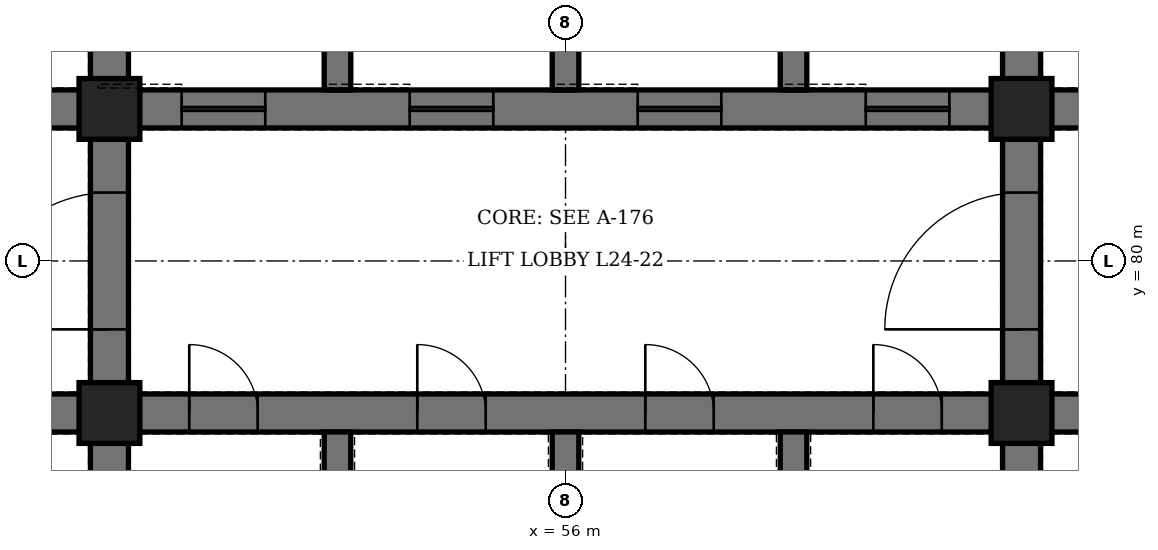
"""IFC4 building model, lengths in metres.
Left out: names, types, materials, properties, quantities, classifications, styles, units other than length and angle.
Written with IfcOpenShell. Run it as: python <this file> out.ifc"""

import sys

from ifc_helpers import new_model, si_unit, direction, frame, frame_2d, origin, origin_2d, place, context, subcontext, project, spatial, rectangle, hollow_rectangle, extrude, element, fill, save


model = new_model("IFC4")
c1 = context("Model", 3, precision=1e-05, world=origin(), true_north=direction((0.0, 1.0)))
c2 = subcontext(c1, "Body", "Model", "MODEL_VIEW")
j1 = project(units=[si_unit("LENGTHUNIT", "METRE"), si_unit("PLANEANGLEUNIT", "RADIAN")], contexts=[c1])
p1 = place(None, origin())
s1 = spatial("IfcSite", under=j1, at=p1, CompositionType="ELEMENT")
p2 = place(p1, origin())
s2 = spatial("IfcBuilding", under=s1, at=p2, CompositionType="ELEMENT")
p3 = place(p2, frame((0.0, 0.0, 112.3)))
s3 = spatial("IfcBuildingStorey", under=s2, at=p3, CompositionType="ELEMENT", Elevation=112.3)
p4 = place(p3, frame((50.0, 71.6, 0.0), z_axis=(0.0, 0.0, 1.0), x_axis=(0.0, 1.0, 0.0)))
e1 = element("IfcWall", 1, at=p4, inside=s3, PredefinedType="SHEAR", context=c2, shape_type="SweptSolid", body=[
    extrude(rectangle(XDim=16.8, YDim=0.5, at=frame_2d((8.4, 0.0))), origin(), (0.0, 0.0, 1.0), 4.2),
])
p5 = place(p4, frame((7.5, 0.0, 0.0)))
e2 = element("IfcOpeningElement", 2, at=p5, cuts=e1, PredefinedType="OPENING", context=c2, shape_type="SweptSolid", body=[
    extrude(rectangle(XDim=1.8, YDim=2.4, at=frame_2d((0.9, 1.2))), frame((0.0, 0.26, 0.0), z_axis=(0.0, -1.0, 0.0), x_axis=(1.0, 0.0, 0.0)), (0.0, 0.0, 1.0), 0.52),
])
p6 = place(p3, frame((62.0, 71.6, 0.0), z_axis=(0.0, 0.0, 1.0), x_axis=(0.0, 1.0, 0.0)))
e3 = element("IfcWall", 3, at=p6, inside=s3, PredefinedType="SHEAR", context=c2, shape_type="SweptSolid", body=[
    extrude(rectangle(XDim=16.8, YDim=0.5, at=frame_2d((8.4, 0.0))), origin(), (0.0, 0.0, 1.0), 4.2),
])
p7 = place(p6, frame((7.5, 0.0, 0.0)))
e4 = element("IfcOpeningElement", 4, at=p7, cuts=e3, PredefinedType="OPENING", context=c2, shape_type="SweptSolid", body=[
    extrude(rectangle(XDim=1.8, YDim=2.4, at=frame_2d((0.9, 1.2))), frame((0.0, 0.26, 0.0), z_axis=(0.0, -1.0, 0.0), x_axis=(1.0, 0.0, 0.0)), (0.0, 0.0, 1.0), 0.52),
])
p8 = place(p3, frame((44.6, 78.0, 0.0), z_axis=(0.0, 0.0, 1.0), x_axis=(1.0, 0.0, 0.0)))
e5 = element("IfcWall", 5, at=p8, inside=s3, PredefinedType="SHEAR", context=c2, shape_type="SweptSolid", body=[
    extrude(rectangle(XDim=5.15, YDim=0.5, at=frame_2d((2.575, 0.0))), origin(), (0.0, 0.0, 1.0), 4.2),
])
p9 = place(p8, frame((1.8, 0.0, 0.0)))
e6 = element("IfcOpeningElement", 6, at=p9, cuts=e5, PredefinedType="OPENING", context=c2, shape_type="SweptSolid", body=[
    extrude(rectangle(XDim=1.2, YDim=2.1, at=frame_2d((0.6, 1.05))), frame((0.0, 0.26, 0.0), z_axis=(0.0, -1.0, 0.0), x_axis=(1.0, 0.0, 0.0)), (0.0, 0.0, 1.0), 0.52),
])
p10 = place(p3, frame((44.6, 82.0, 0.0), z_axis=(0.0, 0.0, 1.0), x_axis=(1.0, 0.0, 0.0)))
e7 = element("IfcWall", 7, at=p10, inside=s3, PredefinedType="SHEAR", context=c2, shape_type="SweptSolid", body=[
    extrude(rectangle(XDim=5.15, YDim=0.5, at=frame_2d((2.575, 0.0))), origin(), (0.0, 0.0, 1.0), 4.2),
])
p11 = place(p10, frame((0.7, 0.0, 0.0)))
e8 = element("IfcOpeningElement", 8, at=p11, cuts=e7, PredefinedType="OPENING", context=c2, shape_type="SweptSolid", body=[
    extrude(rectangle(XDim=0.9, YDim=2.1, at=frame_2d((0.45, 1.05))), frame((0.0, 0.26, 0.0), z_axis=(0.0, -1.0, 0.0), x_axis=(1.0, 0.0, 0.0)), (0.0, 0.0, 1.0), 0.52),
])
p12 = place(p3, frame((62.25, 78.0, 0.0), z_axis=(0.0, 0.0, 1.0), x_axis=(1.0, 0.0, 0.0)))
e9 = element("IfcWall", 9, at=p12, inside=s3, PredefinedType="SHEAR", context=c2, shape_type="SweptSolid", body=[
    extrude(rectangle(XDim=5.15, YDim=0.5, at=frame_2d((2.575, 0.0))), origin(), (0.0, 0.0, 1.0), 4.2),
])
p13 = place(p12, frame((2.15, 0.0, 0.0)))
e10 = element("IfcOpeningElement", 10, at=p13, cuts=e9, PredefinedType="OPENING", context=c2, shape_type="SweptSolid", body=[
    extrude(rectangle(XDim=1.2, YDim=2.1, at=frame_2d((0.6, 1.05))), frame((0.0, 0.26, 0.0), z_axis=(0.0, -1.0, 0.0), x_axis=(1.0, 0.0, 0.0)), (0.0, 0.0, 1.0), 0.52),
])
p14 = place(p3, frame((62.25, 82.0, 0.0), z_axis=(0.0, 0.0, 1.0), x_axis=(1.0, 0.0, 0.0)))
e11 = element("IfcWall", 11, at=p14, inside=s3, PredefinedType="SHEAR", context=c2, shape_type="SweptSolid", body=[
    extrude(rectangle(XDim=5.15, YDim=0.5, at=frame_2d((2.575, 0.0))), origin(), (0.0, 0.0, 1.0), 4.2),
])
p15 = place(p14, frame((2.15, 0.0, 0.0)))
e12 = element("IfcOpeningElement", 12, at=p15, cuts=e11, PredefinedType="OPENING", context=c2, shape_type="SweptSolid", body=[
    extrude(rectangle(XDim=1.2, YDim=2.1, at=frame_2d((0.6, 1.05))), frame((0.0, 0.26, 0.0), z_axis=(0.0, -1.0, 0.0), x_axis=(1.0, 0.0, 0.0)), (0.0, 0.0, 1.0), 0.52),
])
p16 = place(p3, frame((50.25, 78.0, 0.0), z_axis=(0.0, 0.0, 1.0), x_axis=(1.0, 0.0, 0.0)))
e13 = element("IfcWall", 13, at=p16, inside=s3, PredefinedType="SHEAR", context=c2, shape_type="SweptSolid", body=[
    extrude(rectangle(XDim=11.5, YDim=0.5, at=frame_2d((5.75, 0.0))), origin(), (0.0, 0.0, 1.0), 4.2),
])
p17 = place(p16, frame((0.8, 0.0, 0.0)))
e14 = element("IfcOpeningElement", 14, at=p17, cuts=e13, PredefinedType="OPENING", context=c2, shape_type="SweptSolid", body=[
    extrude(rectangle(XDim=0.9, YDim=2.1, at=frame_2d((0.45, 1.05))), frame((0.0, 0.26, 0.0), z_axis=(0.0, -1.0, 0.0), x_axis=(1.0, 0.0, 0.0)), (0.0, 0.0, 1.0), 0.52),
])
p18 = place(p16, frame((3.8, 0.0, 0.0)))
e15 = element("IfcOpeningElement", 15, at=p18, cuts=e13, PredefinedType="OPENING", context=c2, shape_type="SweptSolid", body=[
    extrude(rectangle(XDim=0.9, YDim=2.1, at=frame_2d((0.45, 1.05))), frame((0.0, 0.26, 0.0), z_axis=(0.0, -1.0, 0.0), x_axis=(1.0, 0.0, 0.0)), (0.0, 0.0, 1.0), 0.52),
])
p19 = place(p16, frame((6.8, 0.0, 0.0)))
e16 = element("IfcOpeningElement", 16, at=p19, cuts=e13, PredefinedType="OPENING", context=c2, shape_type="SweptSolid", body=[
    extrude(rectangle(XDim=0.9, YDim=2.1, at=frame_2d((0.45, 1.05))), frame((0.0, 0.26, 0.0), z_axis=(0.0, -1.0, 0.0), x_axis=(1.0, 0.0, 0.0)), (0.0, 0.0, 1.0), 0.52),
])
p20 = place(p16, frame((9.8, 0.0, 0.0)))
e17 = element("IfcOpeningElement", 17, at=p20, cuts=e13, PredefinedType="OPENING", context=c2, shape_type="SweptSolid", body=[
    extrude(rectangle(XDim=0.9, YDim=2.1, at=frame_2d((0.45, 1.05))), frame((0.0, 0.26, 0.0), z_axis=(0.0, -1.0, 0.0), x_axis=(1.0, 0.0, 0.0)), (0.0, 0.0, 1.0), 0.52),
])
p21 = place(p3, frame((50.25, 82.0, 0.0), z_axis=(0.0, 0.0, 1.0), x_axis=(1.0, 0.0, 0.0)))
e18 = element("IfcWall", 18, at=p21, inside=s3, PredefinedType="SHEAR", context=c2, shape_type="SweptSolid", body=[
    extrude(rectangle(XDim=11.5, YDim=0.5, at=frame_2d((5.75, 0.0))), origin(), (0.0, 0.0, 1.0), 4.2),
])
p22 = place(p21, frame((0.7, 0.0, 0.0)))
e19 = element("IfcOpeningElement", 19, at=p22, cuts=e18, PredefinedType="OPENING", context=c2, shape_type="SweptSolid", body=[
    extrude(rectangle(XDim=1.1, YDim=2.2, at=frame_2d((0.55, 1.1))), frame((0.0, 0.26, 0.0), z_axis=(0.0, -1.0, 0.0), x_axis=(1.0, 0.0, 0.0)), (0.0, 0.0, 1.0), 0.52),
])
p23 = place(p21, frame((3.7, 0.0, 0.0)))
e20 = element("IfcOpeningElement", 20, at=p23, cuts=e18, PredefinedType="OPENING", context=c2, shape_type="SweptSolid", body=[
    extrude(rectangle(XDim=1.1, YDim=2.2, at=frame_2d((0.55, 1.1))), frame((0.0, 0.26, 0.0), z_axis=(0.0, -1.0, 0.0), x_axis=(1.0, 0.0, 0.0)), (0.0, 0.0, 1.0), 0.52),
])
p24 = place(p21, frame((6.7, 0.0, 0.0)))
e21 = element("IfcOpeningElement", 21, at=p24, cuts=e18, PredefinedType="OPENING", context=c2, shape_type="SweptSolid", body=[
    extrude(rectangle(XDim=1.1, YDim=2.2, at=frame_2d((0.55, 1.1))), frame((0.0, 0.26, 0.0), z_axis=(0.0, -1.0, 0.0), x_axis=(1.0, 0.0, 0.0)), (0.0, 0.0, 1.0), 0.52),
])
p25 = place(p21, frame((9.7, 0.0, 0.0)))
e22 = element("IfcOpeningElement", 22, at=p25, cuts=e18, PredefinedType="OPENING", context=c2, shape_type="SweptSolid", body=[
    extrude(rectangle(XDim=1.1, YDim=2.2, at=frame_2d((0.55, 1.1))), frame((0.0, 0.26, 0.0), z_axis=(0.0, -1.0, 0.0), x_axis=(1.0, 0.0, 0.0)), (0.0, 0.0, 1.0), 0.52),
])
p26 = place(p3, frame((53.0, 74.175, 0.0), z_axis=(0.0, 0.0, 1.0), x_axis=(0.0, 1.0, 0.0)))
e23 = element("IfcWall", 23, at=p26, inside=s3, PredefinedType="SHEAR", context=c2, shape_type="SweptSolid", body=[
    extrude(rectangle(XDim=3.575, YDim=0.35, at=frame_2d((1.788, 0.0))), origin(), (0.0, 0.0, 1.0), 4.2),
])
p27 = place(p3, frame((53.0, 82.25, 0.0), z_axis=(0.0, 0.0, 1.0), x_axis=(0.0, 1.0, 0.0)))
e24 = element("IfcWall", 24, at=p27, inside=s3, PredefinedType="SHEAR", context=c2, shape_type="SweptSolid", body=[
    extrude(rectangle(XDim=3.5, YDim=0.35, at=frame_2d((1.75, 0.0))), origin(), (0.0, 0.0, 1.0), 4.2),
])
p28 = place(p3, frame((56.0, 74.175, 0.0), z_axis=(0.0, 0.0, 1.0), x_axis=(0.0, 1.0, 0.0)))
e25 = element("IfcWall", 25, at=p28, inside=s3, PredefinedType="SHEAR", context=c2, shape_type="SweptSolid", body=[
    extrude(rectangle(XDim=3.575, YDim=0.35, at=frame_2d((1.788, 0.0))), origin(), (0.0, 0.0, 1.0), 4.2),
])
p29 = place(p3, frame((56.0, 82.25, 0.0), z_axis=(0.0, 0.0, 1.0), x_axis=(0.0, 1.0, 0.0)))
e26 = element("IfcWall", 26, at=p29, inside=s3, PredefinedType="SHEAR", context=c2, shape_type="SweptSolid", body=[
    extrude(rectangle(XDim=3.5, YDim=0.35, at=frame_2d((1.75, 0.0))), origin(), (0.0, 0.0, 1.0), 4.2),
])
p30 = place(p3, frame((59.0, 74.175, 0.0), z_axis=(0.0, 0.0, 1.0), x_axis=(0.0, 1.0, 0.0)))
e27 = element("IfcWall", 27, at=p30, inside=s3, PredefinedType="SHEAR", context=c2, shape_type="SweptSolid", body=[
    extrude(rectangle(XDim=3.575, YDim=0.35, at=frame_2d((1.788, 0.0))), origin(), (0.0, 0.0, 1.0), 4.2),
])
p31 = place(p3, frame((59.0, 82.25, 0.0), z_axis=(0.0, 0.0, 1.0), x_axis=(0.0, 1.0, 0.0)))
e28 = element("IfcWall", 28, at=p31, inside=s3, PredefinedType="SHEAR", context=c2, shape_type="SweptSolid", body=[
    extrude(rectangle(XDim=3.5, YDim=0.35, at=frame_2d((1.75, 0.0))), origin(), (0.0, 0.0, 1.0), 4.2),
])
for number, where, z_axis, x_axis in (
    (29, (50.0, 78.0, 0.0), (0.0, 0.0, 1.0), (1.0, 0.0, 0.0)),
    (30, (50.0, 82.0, 0.0), (0.0, 0.0, 1.0), (1.0, 0.0, 0.0)),
    (31, (62.0, 78.0, 0.0), (0.0, 0.0, 1.0), (1.0, 0.0, 0.0)),
    (32, (62.0, 82.0, 0.0), (0.0, 0.0, 1.0), (1.0, 0.0, 0.0)),
):
    element("IfcColumn", number, at=place(p3, frame(where, z_axis=z_axis, x_axis=x_axis)), inside=s3, PredefinedType="COLUMN", context=c2, shape_type="SweptSolid", body=[
        extrude(hollow_rectangle(XDim=0.8, YDim=0.8, WallThickness=0.1, at=origin_2d()), origin(), (0.0, 0.0, 1.0), 4.2),
    ])
p32 = place(p17, origin())
e33 = element("IfcDoor", 33, at=p32, inside=s3, OperationType="SINGLE_SWING_LEFT", PredefinedType="DOOR", context=c2, shape_type="SweptSolid", body=[
    extrude(rectangle(XDim=0.9, YDim=2.1, at=frame_2d((0.45, 1.05))), frame((0.0, 0.25, 0.0), z_axis=(0.0, -1.0, 0.0), x_axis=(1.0, 0.0, 0.0)), (0.0, 0.0, 1.0), 0.5),
])
fill(e14, e33)
p33 = place(p18, origin())
e34 = element("IfcDoor", 34, at=p33, inside=s3, OperationType="SINGLE_SWING_LEFT", PredefinedType="DOOR", context=c2, shape_type="SweptSolid", body=[
    extrude(rectangle(XDim=0.9, YDim=2.1, at=frame_2d((0.45, 1.05))), frame((0.0, 0.25, 0.0), z_axis=(0.0, -1.0, 0.0), x_axis=(1.0, 0.0, 0.0)), (0.0, 0.0, 1.0), 0.5),
])
fill(e15, e34)
p34 = place(p19, origin())
e35 = element("IfcDoor", 35, at=p34, inside=s3, OperationType="SINGLE_SWING_LEFT", PredefinedType="DOOR", context=c2, shape_type="SweptSolid", body=[
    extrude(rectangle(XDim=0.9, YDim=2.1, at=frame_2d((0.45, 1.05))), frame((0.0, 0.25, 0.0), z_axis=(0.0, -1.0, 0.0), x_axis=(1.0, 0.0, 0.0)), (0.0, 0.0, 1.0), 0.5),
])
fill(e16, e35)
p35 = place(p20, origin())
e36 = element("IfcDoor", 36, at=p35, inside=s3, OperationType="SINGLE_SWING_LEFT", PredefinedType="DOOR", context=c2, shape_type="SweptSolid", body=[
    extrude(rectangle(XDim=0.9, YDim=2.1, at=frame_2d((0.45, 1.05))), frame((0.0, 0.25, 0.0), z_axis=(0.0, -1.0, 0.0), x_axis=(1.0, 0.0, 0.0)), (0.0, 0.0, 1.0), 0.5),
])
fill(e17, e36)
p36 = place(p5, origin())
e37 = element("IfcDoor", 37, at=p36, inside=s3, OperationType="DOUBLE_DOOR_SINGLE_SWING", PredefinedType="DOOR", context=c2, shape_type="SweptSolid", body=[
    extrude(rectangle(XDim=1.8, YDim=2.4, at=frame_2d((0.9, 1.2))), frame((0.0, 0.25, 0.0), z_axis=(0.0, -1.0, 0.0), x_axis=(1.0, 0.0, 0.0)), (0.0, 0.0, 1.0), 0.5),
])
fill(e2, e37)
p37 = place(p7, origin())
e38 = element("IfcDoor", 38, at=p37, inside=s3, OperationType="DOUBLE_DOOR_SINGLE_SWING", PredefinedType="DOOR", context=c2, shape_type="SweptSolid", body=[
    extrude(rectangle(XDim=1.8, YDim=2.4, at=frame_2d((0.9, 1.2))), frame((0.0, 0.25, 0.0), z_axis=(0.0, -1.0, 0.0), x_axis=(1.0, 0.0, 0.0)), (0.0, 0.0, 1.0), 0.5),
])
fill(e4, e38)
p38 = place(p22, origin())
e39 = element("IfcDoor", 39, at=p38, inside=s3, OperationType="SLIDING_TO_LEFT", PredefinedType="DOOR", context=c2, shape_type="SweptSolid", body=[
    extrude(rectangle(XDim=1.1, YDim=2.2, at=frame_2d((0.55, 1.1))), frame((0.0, 0.25, 0.0), z_axis=(0.0, -1.0, 0.0), x_axis=(1.0, 0.0, 0.0)), (0.0, 0.0, 1.0), 0.5),
])
fill(e19, e39)
p39 = place(p23, origin())
e40 = element("IfcDoor", 40, at=p39, inside=s3, OperationType="SLIDING_TO_LEFT", PredefinedType="DOOR", context=c2, shape_type="SweptSolid", body=[
    extrude(rectangle(XDim=1.1, YDim=2.2, at=frame_2d((0.55, 1.1))), frame((0.0, 0.25, 0.0), z_axis=(0.0, -1.0, 0.0), x_axis=(1.0, 0.0, 0.0)), (0.0, 0.0, 1.0), 0.5),
])
fill(e20, e40)
p40 = place(p24, origin())
e41 = element("IfcDoor", 41, at=p40, inside=s3, OperationType="SLIDING_TO_LEFT", PredefinedType="DOOR", context=c2, shape_type="SweptSolid", body=[
    extrude(rectangle(XDim=1.1, YDim=2.2, at=frame_2d((0.55, 1.1))), frame((0.0, 0.25, 0.0), z_axis=(0.0, -1.0, 0.0), x_axis=(1.0, 0.0, 0.0)), (0.0, 0.0, 1.0), 0.5),
])
fill(e21, e41)
p41 = place(p25, origin())
e42 = element("IfcDoor", 42, at=p41, inside=s3, OperationType="SLIDING_TO_LEFT", PredefinedType="DOOR", context=c2, shape_type="SweptSolid", body=[
    extrude(rectangle(XDim=1.1, YDim=2.2, at=frame_2d((0.55, 1.1))), frame((0.0, 0.25, 0.0), z_axis=(0.0, -1.0, 0.0), x_axis=(1.0, 0.0, 0.0)), (0.0, 0.0, 1.0), 0.5),
])
fill(e22, e42)
save(model, sys.argv[1])
